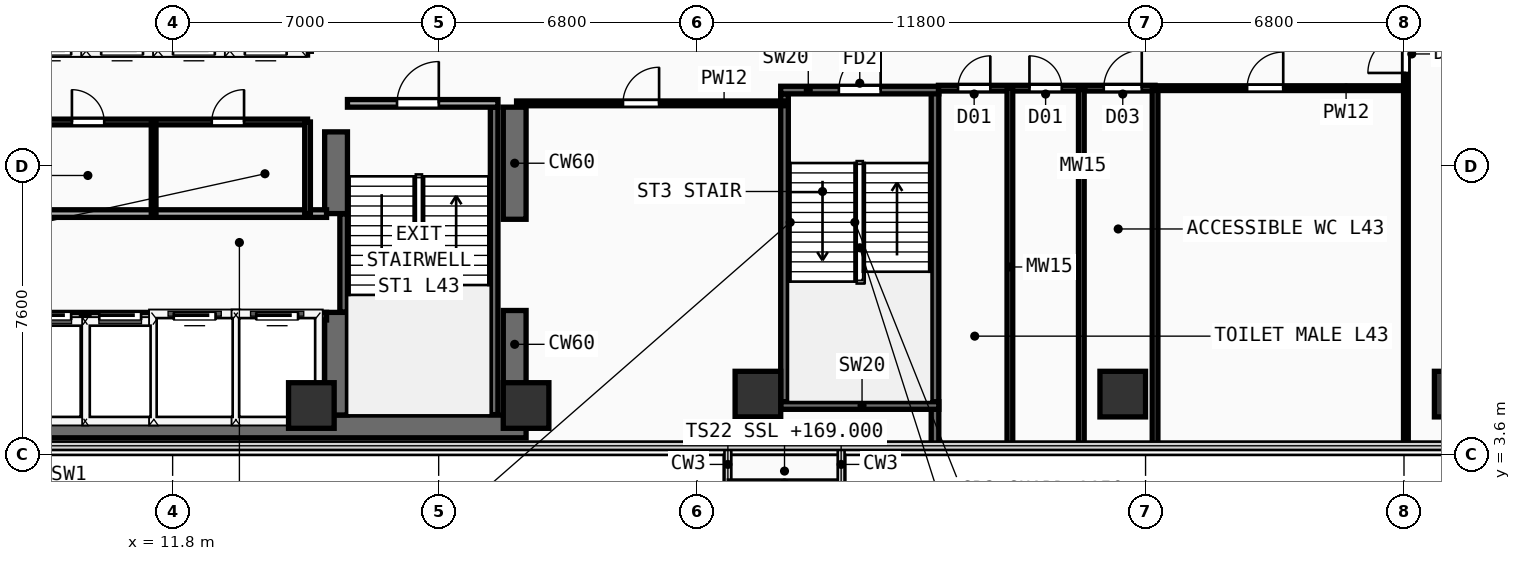
"""IFC4 building model, lengths in metres.
Left out: names, types, materials, properties, quantities, classifications, styles, units other than length and angle.
Written with IfcOpenShell. Run it as: python <this file> out.ifc"""

import sys

from ifc_helpers import new_model, si_unit, direction, frame, frame_2d, origin, origin_2d, place, context, subcontext, project, spatial, rectangle, extrude, element, fill, save


model = new_model("IFC4")
c1 = context("Model", 3, precision=1e-05, world=origin(), true_north=direction((0.0, 1.0)))
c2 = subcontext(c1, "Body", "Model", "MODEL_VIEW")
j1 = project(units=[si_unit("LENGTHUNIT", "METRE"), si_unit("PLANEANGLEUNIT", "RADIAN")], contexts=[c1])
p1 = place(None, origin())
s1 = spatial("IfcSite", under=j1, at=p1, CompositionType="ELEMENT")
p2 = place(p1, origin())
s2 = spatial("IfcBuilding", under=s1, at=p2, CompositionType="ELEMENT")
p3 = place(p2, frame((0.0, 0.0, 169.0)))
s3 = spatial("IfcBuildingStorey", under=s2, at=p3, CompositionType="ELEMENT", Elevation=169.0)
p4 = place(p3, frame((7.15, 4.35, 0.0), z_axis=(0.0, 0.0, 1.0), x_axis=(1.0, 0.0, 0.0)))
e1 = element("IfcWall", 1, at=p4, inside=s3, PredefinedType="SHEAR", context=c2, shape_type="SweptSolid", body=[
    extrude(rectangle(XDim=13.95, YDim=0.6, at=frame_2d((6.975, 0.0))), origin(), (0.0, 0.0, 1.0), 3.56),
])
p5 = place(p3, frame((20.8, 4.65, 0.0), z_axis=(0.0, 0.0, 1.0), x_axis=(0.0, 1.0, 0.0)))
e2 = element("IfcWall", 2, at=p5, inside=s3, PredefinedType="SHEAR", context=c2, shape_type="SweptSolid", body=[
    extrude(rectangle(XDim=2.75, YDim=0.6, at=frame_2d((1.375, 0.0))), origin(), (0.0, 0.0, 1.0), 3.56),
])
p6 = place(p3, frame((20.8, 9.8, 0.0), z_axis=(0.0, 0.0, 1.0), x_axis=(0.0, 1.0, 0.0)))
e3 = element("IfcWall", 3, at=p6, inside=s3, PredefinedType="SHEAR", context=c2, shape_type="SweptSolid", body=[
    extrude(rectangle(XDim=2.95, YDim=0.6, at=frame_2d((1.475, 0.0))), origin(), (0.0, 0.0, 1.0), 3.56),
])
p7 = place(p3, frame((16.1, 4.65, 0.0), z_axis=(0.0, 0.0, 1.0), x_axis=(0.0, 1.0, 0.0)))
e4 = element("IfcWall", 4, at=p7, inside=s3, PredefinedType="SHEAR", context=c2, shape_type="SweptSolid", body=[
    extrude(rectangle(XDim=2.7, YDim=0.6, at=frame_2d((1.35, 0.0))), origin(), (0.0, 0.0, 1.0), 3.56),
])
p8 = place(p3, frame((16.1, 9.95, 0.0), z_axis=(0.0, 0.0, 1.0), x_axis=(0.0, 1.0, 0.0)))
e5 = element("IfcWall", 5, at=p8, inside=s3, PredefinedType="SHEAR", context=c2, shape_type="SweptSolid", body=[
    extrude(rectangle(XDim=2.15, YDim=0.6, at=frame_2d((1.075, 0.0))), origin(), (0.0, 0.0, 1.0), 3.56),
])
for number, where, z_axis, x_axis in (
    (6, (15.45, 4.9, 0.0), (0.0, 0.0, 1.0), (1.0, 0.0, 0.0)),
    (7, (21.1, 4.9, 0.0), (0.0, 0.0, 1.0), (1.0, 0.0, 0.0)),
    (8, (27.2, 5.2, 0.0), (0.0, 0.0, 1.0), (1.0, 0.0, 0.0)),
    (9, (36.8, 5.2, 0.0), (0.0, 0.0, 1.0), (1.0, 0.0, 0.0)),
    (10, (45.6, 5.2, 0.0), (0.0, 0.0, 1.0), (1.0, 0.0, 0.0)),
):
    element("IfcColumn", number, at=place(p3, frame(where, z_axis=z_axis, x_axis=x_axis)), inside=s3, PredefinedType="COLUMN", context=c2, shape_type="SweptSolid", body=[
        extrude(rectangle(XDim=1.2, YDim=1.2, at=origin_2d()), origin(), (0.0, 0.0, 1.0), 3.56),
    ])
p9 = place(p3, frame((16.3, 7.36, 0.0), z_axis=(0.0, 0.0, 1.0), x_axis=(0.0, 1.0, 0.0)))
e11 = element("IfcWall", 11, at=p9, inside=s3, PredefinedType="SHEAR", context=c2, shape_type="SweptSolid", body=[
    extrude(rectangle(XDim=2.58, YDim=0.2, at=frame_2d((1.29, 0.0))), origin(), (0.0, 0.0, 1.0), 3.56),
])
p10 = place(p3, frame((20.26, 4.66, 0.0), z_axis=(0.0, 0.0, 1.0), x_axis=(0.0, 1.0, 0.0)))
e12 = element("IfcWall", 12, at=p10, inside=s3, PredefinedType="SHEAR", context=c2, shape_type="SweptSolid", body=[
    extrude(rectangle(XDim=8.09, YDim=0.2, at=frame_2d((4.045, 0.0))), origin(), (0.0, 0.0, 1.0), 3.56),
])
p11 = place(p3, frame((16.4, 12.85, 0.0), z_axis=(0.0, 0.0, 1.0), x_axis=(1.0, 0.0, 0.0)))
e13 = element("IfcWall", 13, at=p11, inside=s3, PredefinedType="PARTITIONING", context=c2, shape_type="SweptSolid", body=[
    extrude(rectangle(XDim=3.96, YDim=0.2, at=frame_2d((1.98, 0.0))), origin(), (0.0, 0.0, 1.0), 3.56),
])
p12 = place(p11, frame((1.304, 0.0, 0.0)))
e14 = element("IfcOpeningElement", 14, at=p12, cuts=e13, PredefinedType="OPENING", context=c2, shape_type="SweptSolid", body=[
    extrude(rectangle(XDim=1.1, YDim=2.2, at=frame_2d((0.55, 1.1))), frame((0.0, 0.11, 0.0), z_axis=(0.0, -1.0, 0.0), x_axis=(1.0, 0.0, 0.0)), (0.0, 0.0, 1.0), 0.22),
])
p13 = place(p3, frame((27.9, 5.0, 0.0), z_axis=(0.0, 0.0, 1.0), x_axis=(0.0, 1.0, 0.0)))
e15 = element("IfcWall", 15, at=p13, inside=s3, PredefinedType="SHEAR", context=c2, shape_type="SweptSolid", body=[
    extrude(rectangle(XDim=8.1, YDim=0.2, at=frame_2d((4.05, 0.0))), origin(), (0.0, 0.0, 1.0), 3.56),
])
p14 = place(p3, frame((31.86, 3.84, 0.0), z_axis=(0.0, 0.0, 1.0), x_axis=(0.0, 1.0, 0.0)))
e16 = element("IfcWall", 16, at=p14, inside=s3, PredefinedType="SHEAR", context=c2, shape_type="SweptSolid", body=[
    extrude(rectangle(XDim=9.41, YDim=0.2, at=frame_2d((4.705, 0.0))), origin(), (0.0, 0.0, 1.0), 3.56),
])
p15 = place(p3, frame((27.8, 4.9, 0.0), z_axis=(0.0, 0.0, 1.0), x_axis=(1.0, 0.0, 0.0)))
e17 = element("IfcWall", 17, at=p15, inside=s3, PredefinedType="SHEAR", context=c2, shape_type="SweptSolid", body=[
    extrude(rectangle(XDim=4.16, YDim=0.2, at=frame_2d((2.08, 0.0))), origin(), (0.0, 0.0, 1.0), 3.56),
])
p16 = place(p3, frame((27.8, 13.2, 0.0), z_axis=(0.0, 0.0, 1.0), x_axis=(1.0, 0.0, 0.0)))
e18 = element("IfcWall", 18, at=p16, inside=s3, PredefinedType="SHEAR", context=c2, shape_type="SweptSolid", body=[
    extrude(rectangle(XDim=4.16, YDim=0.2, at=frame_2d((2.08, 0.0))), origin(), (0.0, 0.0, 1.0), 3.56),
])
p17 = place(p16, frame((1.53, 0.0, 0.0)))
e19 = element("IfcOpeningElement", 19, at=p17, cuts=e18, PredefinedType="OPENING", context=c2, shape_type="SweptSolid", body=[
    extrude(rectangle(XDim=1.1, YDim=2.2, at=frame_2d((0.55, 1.1))), frame((0.0, 0.11, 0.0), z_axis=(0.0, -1.0, 0.0), x_axis=(1.0, 0.0, 0.0)), (0.0, 0.0, 1.0), 0.22),
])
p18 = place(p3, frame((7.5, 7.25, 0.0), z_axis=(0.0, 0.0, 1.0), x_axis=(1.0, 0.0, 0.0)))
e20 = element("IfcWall", 20, at=p18, inside=s3, PredefinedType="PARTITIONING", context=c2, shape_type="SweptSolid", body=[
    extrude(rectangle(XDim=8.35, YDim=0.2, at=frame_2d((4.175, 0.0))), origin(), (0.0, 0.0, 1.0), 3.56),
])
p19 = place(p18, frame((0.53, 0.0, 0.0)))
e21 = element("IfcOpeningElement", 21, at=p19, cuts=e20, PredefinedType="OPENING", context=c2, shape_type="SweptSolid", body=[
    extrude(rectangle(XDim=1.1, YDim=2.2, at=frame_2d((0.55, 1.1))), frame((0.0, 0.11, 0.0), z_axis=(0.0, -1.0, 0.0), x_axis=(1.0, 0.0, 0.0)), (0.0, 0.0, 1.0), 0.22),
])
p20 = place(p18, frame((2.37, 0.0, 0.0)))
e22 = element("IfcOpeningElement", 22, at=p20, cuts=e20, PredefinedType="OPENING", context=c2, shape_type="SweptSolid", body=[
    extrude(rectangle(XDim=1.1, YDim=2.2, at=frame_2d((0.55, 1.1))), frame((0.0, 0.11, 0.0), z_axis=(0.0, -1.0, 0.0), x_axis=(1.0, 0.0, 0.0)), (0.0, 0.0, 1.0), 0.22),
])
p21 = place(p18, frame((4.33, 0.0, 0.0)))
e23 = element("IfcOpeningElement", 23, at=p21, cuts=e20, PredefinedType="OPENING", context=c2, shape_type="SweptSolid", body=[
    extrude(rectangle(XDim=1.1, YDim=2.2, at=frame_2d((0.55, 1.1))), frame((0.0, 0.11, 0.0), z_axis=(0.0, -1.0, 0.0), x_axis=(1.0, 0.0, 0.0)), (0.0, 0.0, 1.0), 0.22),
])
p22 = place(p18, frame((6.5, 0.0, 0.0)))
e24 = element("IfcOpeningElement", 24, at=p22, cuts=e20, PredefinedType="OPENING", context=c2, shape_type="SweptSolid", body=[
    extrude(rectangle(XDim=1.1, YDim=2.2, at=frame_2d((0.55, 1.1))), frame((0.0, 0.11, 0.0), z_axis=(0.0, -1.0, 0.0), x_axis=(1.0, 0.0, 0.0)), (0.0, 0.0, 1.0), 0.22),
])
p23 = place(p3, frame((7.5, 9.95, 0.0), z_axis=(0.0, 0.0, 1.0), x_axis=(1.0, 0.0, 0.0)))
e25 = element("IfcWall", 25, at=p23, inside=s3, PredefinedType="PARTITIONING", context=c2, shape_type="SweptSolid", body=[
    extrude(rectangle(XDim=8.35, YDim=0.2, at=frame_2d((4.175, 0.0))), origin(), (0.0, 0.0, 1.0), 3.56),
])
for number, where, z_axis, x_axis in (
    (26, (9.5, 4.45, 0.0), (0.0, 0.0, 1.0), (0.0, 1.0, 0.0)),
    (27, (11.36, 4.45, 0.0), (0.0, 0.0, 1.0), (0.0, 1.0, 0.0)),
    (28, (13.46, 4.45, 0.0), (0.0, 0.0, 1.0), (0.0, 1.0, 0.0)),
):
    element("IfcWall", number, at=place(p3, frame(where, z_axis=z_axis, x_axis=x_axis)), inside=s3, PredefinedType="PARTITIONING", context=c2, shape_type="SweptSolid", body=[
        extrude(rectangle(XDim=2.8, YDim=0.2, at=frame_2d((1.4, 0.0))), origin(), (0.0, 0.0, 1.0), 3.56),
    ])
p24 = place(p3, frame((7.5, 12.36, 0.0), z_axis=(0.0, 0.0, 1.0), x_axis=(1.0, 0.0, 0.0)))
e29 = element("IfcWall", 29, at=p24, inside=s3, PredefinedType="PARTITIONING", context=c2, shape_type="SweptSolid", body=[
    extrude(rectangle(XDim=7.85, YDim=0.15, at=frame_2d((3.925, 0.0))), origin(), (0.0, 0.0, 1.0), 3.56),
])
p25 = place(p24, frame((1.65, 0.0, 0.0)))
e30 = element("IfcOpeningElement", 30, at=p25, cuts=e29, PredefinedType="OPENING", context=c2, shape_type="SweptSolid", body=[
    extrude(rectangle(XDim=0.85, YDim=2.15, at=frame_2d((0.425, 1.075))), frame((0.0, 0.085, 0.0), z_axis=(0.0, -1.0, 0.0), x_axis=(1.0, 0.0, 0.0)), (0.0, 0.0, 1.0), 0.17),
])
p26 = place(p24, frame((5.329, 0.0, 0.0)))
e31 = element("IfcOpeningElement", 31, at=p26, cuts=e29, PredefinedType="OPENING", context=c2, shape_type="SweptSolid", body=[
    extrude(rectangle(XDim=0.85, YDim=2.15, at=frame_2d((0.425, 1.075))), frame((0.0, 0.085, 0.0), z_axis=(0.0, -1.0, 0.0), x_axis=(1.0, 0.0, 0.0)), (0.0, 0.0, 1.0), 0.17),
])
p27 = place(p3, frame((15.35, 9.95, 0.0), z_axis=(0.0, 0.0, 1.0), x_axis=(0.0, 1.0, 0.0)))
e32 = element("IfcWall", 32, at=p27, inside=s3, PredefinedType="PARTITIONING", context=c2, shape_type="SweptSolid", body=[
    extrude(rectangle(XDim=2.41, YDim=0.15, at=frame_2d((1.205, 0.0))), origin(), (0.0, 0.0, 1.0), 3.56),
])
p28 = place(p3, frame((11.3, 9.95, 0.0), z_axis=(0.0, 0.0, 1.0), x_axis=(0.0, 1.0, 0.0)))
e33 = element("IfcWall", 33, at=p28, inside=s3, PredefinedType="PARTITIONING", context=c2, shape_type="SweptSolid", body=[
    extrude(rectangle(XDim=2.41, YDim=0.125, at=frame_2d((1.205, 0.0))), origin(), (0.0, 0.0, 1.0), 3.56),
])
p29 = place(p3, frame((7.5, 14.22, 0.0), z_axis=(0.0, 0.0, 1.0), x_axis=(1.0, 0.0, 0.0)))
e34 = element("IfcWall", 34, at=p29, inside=s3, PredefinedType="PARTITIONING", context=c2, shape_type="SweptSolid", body=[
    extrude(rectangle(XDim=7.85, YDim=0.2, at=frame_2d((3.925, 0.0))), origin(), (0.0, 0.0, 1.0), 3.56),
])
p30 = place(p29, frame((0.53, 0.0, 0.0)))
e35 = element("IfcOpeningElement", 35, at=p30, cuts=e34, PredefinedType="OPENING", context=c2, shape_type="SweptSolid", body=[
    extrude(rectangle(XDim=1.1, YDim=2.2, at=frame_2d((0.55, 1.1))), frame((0.0, 0.11, 0.0), z_axis=(0.0, -1.0, 0.0), x_axis=(1.0, 0.0, 0.0)), (0.0, 0.0, 1.0), 0.22),
])
p31 = place(p29, frame((2.42, 0.0, 0.0)))
e36 = element("IfcOpeningElement", 36, at=p31, cuts=e34, PredefinedType="OPENING", context=c2, shape_type="SweptSolid", body=[
    extrude(rectangle(XDim=1.1, YDim=2.2, at=frame_2d((0.55, 1.1))), frame((0.0, 0.11, 0.0), z_axis=(0.0, -1.0, 0.0), x_axis=(1.0, 0.0, 0.0)), (0.0, 0.0, 1.0), 0.22),
])
p32 = place(p29, frame((4.31, 0.0, 0.0)))
e37 = element("IfcOpeningElement", 37, at=p32, cuts=e34, PredefinedType="OPENING", context=c2, shape_type="SweptSolid", body=[
    extrude(rectangle(XDim=1.1, YDim=2.2, at=frame_2d((0.55, 1.1))), frame((0.0, 0.11, 0.0), z_axis=(0.0, -1.0, 0.0), x_axis=(1.0, 0.0, 0.0)), (0.0, 0.0, 1.0), 0.22),
])
p33 = place(p29, frame((6.2, 0.0, 0.0)))
e38 = element("IfcOpeningElement", 38, at=p33, cuts=e34, PredefinedType="OPENING", context=c2, shape_type="SweptSolid", body=[
    extrude(rectangle(XDim=1.1, YDim=2.2, at=frame_2d((0.55, 1.1))), frame((0.0, 0.11, 0.0), z_axis=(0.0, -1.0, 0.0), x_axis=(1.0, 0.0, 0.0)), (0.0, 0.0, 1.0), 0.22),
])
p34 = place(p3, frame((31.95, 13.25, 0.0), z_axis=(0.0, 0.0, 1.0), x_axis=(1.0, 0.0, 0.0)))
e39 = element("IfcWall", 39, at=p34, inside=s3, PredefinedType="PLUMBINGWALL", context=c2, shape_type="SweptSolid", body=[
    extrude(rectangle(XDim=5.7, YDim=0.15, at=frame_2d((2.85, 0.0))), origin(), (0.0, 0.0, 1.0), 3.16),
])
p35 = place(p34, frame((0.515, 0.0, 0.0)))
e40 = element("IfcOpeningElement", 40, at=p35, cuts=e39, PredefinedType="OPENING", context=c2, shape_type="SweptSolid", body=[
    extrude(rectangle(XDim=0.85, YDim=2.15, at=frame_2d((0.425, 1.075))), frame((0.0, 0.085, 0.0), z_axis=(0.0, -1.0, 0.0), x_axis=(1.0, 0.0, 0.0)), (0.0, 0.0, 1.0), 0.17),
])
p36 = place(p34, frame((2.395, 0.0, 0.0)))
e41 = element("IfcOpeningElement", 41, at=p36, cuts=e39, PredefinedType="OPENING", context=c2, shape_type="SweptSolid", body=[
    extrude(rectangle(XDim=0.85, YDim=2.15, at=frame_2d((0.425, 1.075))), frame((0.0, 0.085, 0.0), z_axis=(0.0, -1.0, 0.0), x_axis=(1.0, 0.0, 0.0)), (0.0, 0.0, 1.0), 0.17),
])
p37 = place(p34, frame((4.35, 0.0, 0.0)))
e42 = element("IfcOpeningElement", 42, at=p37, cuts=e39, PredefinedType="OPENING", context=c2, shape_type="SweptSolid", body=[
    extrude(rectangle(XDim=1.0, YDim=2.2, at=frame_2d((0.5, 1.1))), frame((0.0, 0.085, 0.0), z_axis=(0.0, -1.0, 0.0), x_axis=(1.0, 0.0, 0.0)), (0.0, 0.0, 1.0), 0.17),
])
for number, where, z_axis, x_axis in (
    (43, (33.83, 3.84, 0.0), (0.0, 0.0, 1.0), (0.0, 1.0, 0.0)),
    (44, (35.71, 3.84, 0.0), (0.0, 0.0, 1.0), (0.0, 1.0, 0.0)),
    (45, (37.65, 3.84, 0.0), (0.0, 0.0, 1.0), (0.0, 1.0, 0.0)),
):
    element("IfcWall", number, at=place(p3, frame(where, z_axis=z_axis, x_axis=x_axis)), inside=s3, PredefinedType="PLUMBINGWALL", context=c2, shape_type="SweptSolid", body=[
        extrude(rectangle(XDim=9.41, YDim=0.15, at=frame_2d((4.705, 0.0))), origin(), (0.0, 0.0, 1.0), 3.56),
    ])
p38 = place(p3, frame((20.85, 12.85, 0.0), z_axis=(0.0, 0.0, 1.0), x_axis=(1.0, 0.0, 0.0)))
e46 = element("IfcWall", 46, at=p38, inside=s3, PredefinedType="PARTITIONING", context=c2, shape_type="SweptSolid", body=[
    extrude(rectangle(XDim=7.05, YDim=0.125, at=frame_2d((3.525, 0.0))), origin(), (0.0, 0.0, 1.0), 3.56),
])
p39 = place(p38, frame((2.8, 0.0, 0.0)))
e47 = element("IfcOpeningElement", 47, at=p39, cuts=e46, PredefinedType="OPENING", context=c2, shape_type="SweptSolid", body=[
    extrude(rectangle(XDim=0.95, YDim=2.15, at=frame_2d((0.475, 1.075))), frame((0.0, 0.073, 0.0), z_axis=(0.0, -1.0, 0.0), x_axis=(1.0, 0.0, 0.0)), (0.0, 0.0, 1.0), 0.145),
])
p40 = place(p3, frame((37.65, 13.25, 0.0), z_axis=(0.0, 0.0, 1.0), x_axis=(1.0, 0.0, 0.0)))
e48 = element("IfcWall", 48, at=p40, inside=s3, PredefinedType="PARTITIONING", context=c2, shape_type="SweptSolid", body=[
    extrude(rectangle(XDim=6.6, YDim=0.125, at=frame_2d((3.3, 0.0))), origin(), (0.0, 0.0, 1.0), 3.16),
])
p41 = place(p40, frame((2.422, 0.0, 0.0)))
e49 = element("IfcOpeningElement", 49, at=p41, cuts=e48, PredefinedType="OPENING", context=c2, shape_type="SweptSolid", body=[
    extrude(rectangle(XDim=0.95, YDim=2.15, at=frame_2d((0.475, 1.075))), frame((0.0, 0.073, 0.0), z_axis=(0.0, -1.0, 0.0), x_axis=(1.0, 0.0, 0.0)), (0.0, 0.0, 1.0), 0.145),
])
p42 = place(p3, frame((44.25, 3.84, 0.0), z_axis=(0.0, 0.0, 1.0), x_axis=(0.0, 1.0, 0.0)))
e50 = element("IfcWall", 50, at=p42, inside=s3, PredefinedType="PARTITIONING", context=c2, shape_type="SweptSolid", body=[
    extrude(rectangle(XDim=17.12, YDim=0.125, at=frame_2d((8.56, 0.0))), origin(), (0.0, 0.0, 1.0), 3.56),
])
p43 = place(p42, frame((9.81, 0.0, 0.0)))
e51 = element("IfcOpeningElement", 51, at=p43, cuts=e50, PredefinedType="OPENING", context=c2, shape_type="SweptSolid", body=[
    extrude(rectangle(XDim=1.0, YDim=2.2, at=frame_2d((0.5, 1.1))), frame((0.0, 0.073, 0.0), z_axis=(0.0, -1.0, 0.0), x_axis=(1.0, 0.0, 0.0)), (0.0, 0.0, 1.0), 0.145),
])
p44 = place(p12, frame((1.1, 0.0, 0.0), z_axis=(0.0, 0.0, 1.0), x_axis=(-1.0, 0.0, 0.0)))
e52 = element("IfcDoor", 52, at=p44, inside=s3, OperationType="SINGLE_SWING_LEFT", PredefinedType="DOOR", context=c2, shape_type="SweptSolid", body=[
    extrude(rectangle(XDim=1.1, YDim=2.2, at=frame_2d((0.55, 1.1))), frame((0.0, 0.025, 0.0), z_axis=(0.0, -1.0, 0.0), x_axis=(1.0, 0.0, 0.0)), (0.0, 0.0, 1.0), 0.05),
])
fill(e14, e52)
p45 = place(p17, frame((1.1, 0.0, 0.0), z_axis=(0.0, 0.0, 1.0), x_axis=(-1.0, 0.0, 0.0)))
e53 = element("IfcDoor", 53, at=p45, inside=s3, OperationType="SINGLE_SWING_LEFT", PredefinedType="DOOR", context=c2, shape_type="SweptSolid", body=[
    extrude(rectangle(XDim=1.1, YDim=2.2, at=frame_2d((0.55, 1.1))), frame((0.0, 0.025, 0.0), z_axis=(0.0, -1.0, 0.0), x_axis=(1.0, 0.0, 0.0)), (0.0, 0.0, 1.0), 0.05),
])
fill(e19, e53)
p46 = place(p19, origin())
e54 = element("IfcDoor", 54, at=p46, inside=s3, OperationType="SLIDING_TO_LEFT", PredefinedType="DOOR", context=c2, shape_type="SweptSolid", body=[
    extrude(rectangle(XDim=1.1, YDim=2.2, at=frame_2d((0.55, 1.1))), frame((0.0, 0.025, 0.0), z_axis=(0.0, -1.0, 0.0), x_axis=(1.0, 0.0, 0.0)), (0.0, 0.0, 1.0), 0.05),
])
fill(e21, e54)
p47 = place(p20, origin())
e55 = element("IfcDoor", 55, at=p47, inside=s3, OperationType="SLIDING_TO_LEFT", PredefinedType="DOOR", context=c2, shape_type="SweptSolid", body=[
    extrude(rectangle(XDim=1.1, YDim=2.2, at=frame_2d((0.55, 1.1))), frame((0.0, 0.025, 0.0), z_axis=(0.0, -1.0, 0.0), x_axis=(1.0, 0.0, 0.0)), (0.0, 0.0, 1.0), 0.05),
])
fill(e22, e55)
p48 = place(p21, origin())
e56 = element("IfcDoor", 56, at=p48, inside=s3, OperationType="SLIDING_TO_LEFT", PredefinedType="DOOR", context=c2, shape_type="SweptSolid", body=[
    extrude(rectangle(XDim=1.1, YDim=2.2, at=frame_2d((0.55, 1.1))), frame((0.0, 0.025, 0.0), z_axis=(0.0, -1.0, 0.0), x_axis=(1.0, 0.0, 0.0)), (0.0, 0.0, 1.0), 0.05),
])
fill(e23, e56)
p49 = place(p22, origin())
e57 = element("IfcDoor", 57, at=p49, inside=s3, OperationType="SLIDING_TO_LEFT", PredefinedType="DOOR", context=c2, shape_type="SweptSolid", body=[
    extrude(rectangle(XDim=1.1, YDim=2.2, at=frame_2d((0.55, 1.1))), frame((0.0, 0.025, 0.0), z_axis=(0.0, -1.0, 0.0), x_axis=(1.0, 0.0, 0.0)), (0.0, 0.0, 1.0), 0.05),
])
fill(e24, e57)
p50 = place(p25, origin())
e58 = element("IfcDoor", 58, at=p50, inside=s3, OperationType="SINGLE_SWING_LEFT", PredefinedType="DOOR", context=c2, shape_type="SweptSolid", body=[
    extrude(rectangle(XDim=0.85, YDim=2.15, at=frame_2d((0.425, 1.075))), frame((0.0, 0.025, 0.0), z_axis=(0.0, -1.0, 0.0), x_axis=(1.0, 0.0, 0.0)), (0.0, 0.0, 1.0), 0.05),
])
fill(e30, e58)
p51 = place(p26, origin())
e59 = element("IfcDoor", 59, at=p51, inside=s3, OperationType="SINGLE_SWING_RIGHT", PredefinedType="DOOR", context=c2, shape_type="SweptSolid", body=[
    extrude(rectangle(XDim=0.85, YDim=2.15, at=frame_2d((0.425, 1.075))), frame((0.0, 0.025, 0.0), z_axis=(0.0, -1.0, 0.0), x_axis=(1.0, 0.0, 0.0)), (0.0, 0.0, 1.0), 0.05),
])
fill(e31, e59)
p52 = place(p35, origin())
e60 = element("IfcDoor", 60, at=p52, inside=s3, OperationType="SINGLE_SWING_RIGHT", PredefinedType="DOOR", context=c2, shape_type="SweptSolid", body=[
    extrude(rectangle(XDim=0.85, YDim=2.15, at=frame_2d((0.425, 1.075))), frame((0.0, 0.025, 0.0), z_axis=(0.0, -1.0, 0.0), x_axis=(1.0, 0.0, 0.0)), (0.0, 0.0, 1.0), 0.05),
])
fill(e40, e60)
p53 = place(p36, origin())
e61 = element("IfcDoor", 61, at=p53, inside=s3, OperationType="SINGLE_SWING_LEFT", PredefinedType="DOOR", context=c2, shape_type="SweptSolid", body=[
    extrude(rectangle(XDim=0.85, YDim=2.15, at=frame_2d((0.425, 1.075))), frame((0.0, 0.025, 0.0), z_axis=(0.0, -1.0, 0.0), x_axis=(1.0, 0.0, 0.0)), (0.0, 0.0, 1.0), 0.05),
])
fill(e41, e61)
p54 = place(p37, origin())
e62 = element("IfcDoor", 62, at=p54, inside=s3, OperationType="SINGLE_SWING_RIGHT", PredefinedType="DOOR", context=c2, shape_type="SweptSolid", body=[
    extrude(rectangle(XDim=1.0, YDim=2.2, at=frame_2d((0.5, 1.1))), frame((0.0, 0.025, 0.0), z_axis=(0.0, -1.0, 0.0), x_axis=(1.0, 0.0, 0.0)), (0.0, 0.0, 1.0), 0.05),
])
fill(e42, e62)
p55 = place(p39, origin())
e63 = element("IfcDoor", 63, at=p55, inside=s3, OperationType="SINGLE_SWING_RIGHT", PredefinedType="DOOR", context=c2, shape_type="SweptSolid", body=[
    extrude(rectangle(XDim=0.95, YDim=2.15, at=frame_2d((0.475, 1.075))), frame((0.0, 0.025, 0.0), z_axis=(0.0, -1.0, 0.0), x_axis=(1.0, 0.0, 0.0)), (0.0, 0.0, 1.0), 0.05),
])
fill(e47, e63)
p56 = place(p41, origin())
e64 = element("IfcDoor", 64, at=p56, inside=s3, OperationType="SINGLE_SWING_RIGHT", PredefinedType="DOOR", context=c2, shape_type="SweptSolid", body=[
    extrude(rectangle(XDim=0.95, YDim=2.15, at=frame_2d((0.475, 1.075))), frame((0.0, 0.025, 0.0), z_axis=(0.0, -1.0, 0.0), x_axis=(1.0, 0.0, 0.0)), (0.0, 0.0, 1.0), 0.05),
])
fill(e49, e64)
p57 = place(p43, origin())
e65 = element("IfcDoor", 65, at=p57, inside=s3, OperationType="SINGLE_SWING_LEFT", PredefinedType="DOOR", context=c2, shape_type="SweptSolid", body=[
    extrude(rectangle(XDim=1.0, YDim=2.2, at=frame_2d((0.5, 1.1))), frame((0.0, 0.025, 0.0), z_axis=(0.0, -1.0, 0.0), x_axis=(1.0, 0.0, 0.0)), (0.0, 0.0, 1.0), 0.05),
])
fill(e51, e65)
save(model, sys.argv[1])
